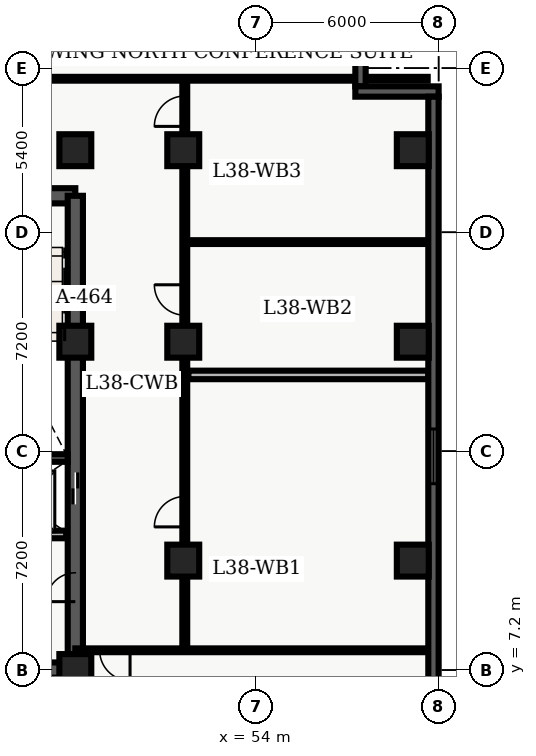
"""IFC4 building model, lengths in metres.
Left out: names, types, materials, properties, quantities, classifications, styles, units other than length and angle.
Written with IfcOpenShell. Run it as: python <this file> out.ifc"""

import sys

from ifc_helpers import new_model, entity, si_unit, converted_unit, direction, frame, origin_with_axes, origin_2d_with_axis, place, context, subcontext, project, spatial, polyline, rectangle, outline, extrude, element, fill, save


model = new_model("IFC4")
c1 = context("Model", 3, precision=1e-05, world=origin_with_axes(), true_north=direction((0.0, 1.0)))
c2 = subcontext(c1, "Body", "Model", "MODEL_VIEW")
j1 = project(units=[si_unit("LENGTHUNIT", "METRE"), converted_unit("PLANEANGLEUNIT", "DEGREE", entity("IfcPlaneAngleMeasure", 0.017), si_unit("PLANEANGLEUNIT", "RADIAN"), dimensions=[0, 0, 0, 0, 0, 0, 0])], contexts=[c1])
p1 = place(None, origin_with_axes())
s1 = spatial("IfcSite", under=j1, at=p1, CompositionType="ELEMENT")
p2 = place(p1, origin_with_axes())
s2 = spatial("IfcBuilding", under=s1, at=p2, CompositionType="ELEMENT")
p3 = place(p2, frame((0.0, 0.0, 156.3), z_axis=(0.0, 0.0, 1.0), x_axis=(1.0, 0.0, 0.0)))
s3 = spatial("IfcBuildingStorey", under=s2, at=p3, CompositionType="ELEMENT", Elevation=156.3)
p4 = place(p3, frame((40.2, 7.2, 0.0), z_axis=(0.0, 0.0, 1.0), x_axis=(1.0, 0.0, 0.0)))
e1 = element("IfcWall", 1, at=p4, inside=s3, PredefinedType="SHEAR", context=c2, shape_type="SweptSolid", body=[
    extrude(outline(polyline([(0.0, -0.25), (7.85, -0.25), (7.85, 0.25), (0.0, 0.25), (0.0, -0.25)])), origin_with_axes(), (0.0, 0.0, 1.0), 3.66),
])
p5 = place(p4, frame((2.175, 0.0, 0.0), z_axis=(0.0, 0.0, 1.0), x_axis=(1.0, 0.0, 0.0)))
e2 = element("IfcOpeningElement", 2, at=p5, cuts=e1, PredefinedType="OPENING", context=c2, shape_type="SweptSolid", body=[
    extrude(rectangle(XDim=1.05, YDim=0.52, at=origin_2d_with_axis()), origin_with_axes(), (0.0, 0.0, 1.0), 2.15),
])
p6 = place(p3, frame((40.2, 22.8, 0.0), z_axis=(0.0, 0.0, 1.0), x_axis=(1.0, 0.0, 0.0)))
e3 = element("IfcWall", 3, at=p6, inside=s3, PredefinedType="SHEAR", context=c2, shape_type="SweptSolid", body=[
    extrude(outline(polyline([(0.0, -0.25), (7.85, -0.25), (7.85, 0.25), (0.0, 0.25), (0.0, -0.25)])), origin_with_axes(), (0.0, 0.0, 1.0), 3.66),
])
p7 = place(p6, frame((5.775, 0.0, 0.0), z_axis=(0.0, 0.0, 1.0), x_axis=(1.0, 0.0, 0.0)))
e4 = element("IfcOpeningElement", 4, at=p7, cuts=e3, PredefinedType="OPENING", context=c2, shape_type="SweptSolid", body=[
    extrude(rectangle(XDim=1.05, YDim=0.52, at=origin_2d_with_axis()), origin_with_axes(), (0.0, 0.0, 1.0), 2.15),
])
p8 = place(p3, frame((48.05, 7.2, 0.0), z_axis=(0.0, 0.0, 1.0), x_axis=(0.0, 1.0, 0.0)))
e5 = element("IfcWall", 5, at=p8, inside=s3, PredefinedType="SHEAR", context=c2, shape_type="SweptSolid", body=[
    extrude(outline(polyline([(0.0, -0.25), (15.6, -0.25), (15.6, 0.25), (0.0, 0.25), (0.0, -0.25)])), origin_with_axes(), (0.0, 0.0, 1.0), 3.66),
])
p9 = place(p8, frame((5.975, 0.0, 0.0), z_axis=(0.0, 0.0, 1.0), x_axis=(1.0, 0.0, 0.0)))
e6 = element("IfcOpeningElement", 6, at=p9, cuts=e5, PredefinedType="OPENING", context=c2, shape_type="SweptSolid", body=[
    extrude(rectangle(XDim=1.05, YDim=0.52, at=origin_2d_with_axis()), origin_with_axes(), (0.0, 0.0, 1.0), 2.15),
])
p10 = place(p8, frame((2.725, 0.0, 0.0), z_axis=(0.0, 0.0, 1.0), x_axis=(1.0, 0.0, 0.0)))
e7 = element("IfcOpeningElement", 7, at=p10, cuts=e5, PredefinedType="OPENING", context=c2, shape_type="SweptSolid", body=[
    extrude(rectangle(XDim=0.95, YDim=0.52, at=origin_2d_with_axis()), origin_with_axes(), (0.0, 0.0, 1.0), 2.15),
])
p11 = place(p3, frame((44.25, 14.175, 0.0), z_axis=(0.0, 0.0, 1.0), x_axis=(1.0, 0.0, 0.0)))
e8 = element("IfcWall", 8, at=p11, inside=s3, PredefinedType="SHEAR", context=c2, shape_type="SweptSolid", body=[
    extrude(outline(polyline([(0.0, -0.125), (3.55, -0.125), (3.55, 0.125), (0.0, 0.125), (0.0, -0.125)])), origin_with_axes(), (0.0, 0.0, 1.0), 3.66),
])
for number, where, z_axis, x_axis in (
    (9, (48.05, 7.2, 0.0), (0.0, 0.0, 1.0), (1.0, 0.0, 0.0)),
    (10, (48.05, 18.0, 0.0), (0.0, 0.0, 1.0), (1.0, 0.0, 0.0)),
    (11, (48.05, 24.3, 0.0), (0.0, 0.0, 1.0), (1.0, 0.0, 0.0)),
    (12, (51.6, 10.8, 0.0), (0.0, 0.0, 1.0), (1.0, 0.0, 0.0)),
    (13, (51.6, 18.0, 0.0), (0.0, 0.0, 1.0), (1.0, 0.0, 0.0)),
    (14, (51.6, 24.3, 0.0), (0.0, 0.0, 1.0), (1.0, 0.0, 0.0)),
    (15, (59.15, 10.8, 0.0), (0.0, 0.0, 1.0), (1.0, 0.0, 0.0)),
    (16, (59.15, 18.0, 0.0), (0.0, 0.0, 1.0), (1.0, 0.0, 0.0)),
    (17, (59.15, 24.3, 0.0), (0.0, 0.0, 1.0), (1.0, 0.0, 0.0)),
):
    element("IfcColumn", number, at=place(p3, frame(where, z_axis=z_axis, x_axis=x_axis)), inside=s3, PredefinedType="COLUMN", context=c2, shape_type="SweptSolid", body=[
        extrude(rectangle(XDim=1.05, YDim=1.05, at=origin_2d_with_axis()), origin_with_axes(), (0.0, 0.0, 1.0), 3.9),
    ])
p12 = place(p3, frame((44.25, 11.66, 0.0), z_axis=(0.0, 0.0, 1.0), x_axis=(1.0, 0.0, 0.0)))
e18 = element("IfcWall", 18, at=p12, inside=s3, PredefinedType="SOLIDWALL", context=c2, shape_type="SweptSolid", body=[
    extrude(outline(polyline([(0.0, -0.125), (3.5, -0.125), (3.5, 0.125), (0.0, 0.125), (0.0, -0.125)])), origin_with_axes(), (0.0, 0.0, 1.0), 2.7),
])
p13 = place(p3, frame((51.65, 7.85, 0.0), z_axis=(0.0, 0.0, 1.0), x_axis=(0.0, 1.0, 0.0)))
e19 = element("IfcWall", 19, at=p13, inside=s3, PredefinedType="PARTITIONING", context=c2, shape_type="SweptSolid", body=[
    extrude(outline(polyline([(0.0, -0.08), (18.8, -0.08), (18.8, 0.08), (0.0, 0.08), (0.0, -0.08)])), origin_with_axes(), (0.0, 0.0, 1.0), 2.7),
])
p14 = place(p13, frame((4.559, 0.0, 0.0), z_axis=(0.0, 0.0, 1.0), x_axis=(1.0, 0.0, 0.0)))
e20 = element("IfcOpeningElement", 20, at=p14, cuts=e19, PredefinedType="OPENING", context=c2, shape_type="SweptSolid", body=[
    extrude(rectangle(XDim=1.0, YDim=0.18, at=origin_2d_with_axis()), origin_with_axes(), (0.0, 0.0, 1.0), 2.15),
])
p15 = place(p13, frame((11.523, 0.0, 0.0), z_axis=(0.0, 0.0, 1.0), x_axis=(1.0, 0.0, 0.0)))
e21 = element("IfcOpeningElement", 21, at=p15, cuts=e19, PredefinedType="OPENING", context=c2, shape_type="SweptSolid", body=[
    extrude(rectangle(XDim=1.0, YDim=0.18, at=origin_2d_with_axis()), origin_with_axes(), (0.0, 0.0, 1.0), 2.15),
])
p16 = place(p13, frame((17.733, 0.0, 0.0), z_axis=(0.0, 0.0, 1.0), x_axis=(1.0, 0.0, 0.0)))
e22 = element("IfcOpeningElement", 22, at=p16, cuts=e19, PredefinedType="OPENING", context=c2, shape_type="SweptSolid", body=[
    extrude(rectangle(XDim=1.0, YDim=0.18, at=origin_2d_with_axis()), origin_with_axes(), (0.0, 0.0, 1.0), 2.15),
])
p17 = place(p3, frame((59.665, 7.85, 0.0), z_axis=(0.0, 0.0, 1.0), x_axis=(-1.0, 0.0, 0.0)))
e23 = element("IfcWall", 23, at=p17, inside=s3, PredefinedType="PARTITIONING", context=c2, shape_type="SweptSolid", body=[
    extrude(outline(polyline([(0.0, -0.062), (11.615, -0.062), (11.615, 0.062), (0.0, 0.062), (0.0, -0.062)])), origin_with_axes(), (0.0, 0.0, 1.0), 2.7),
])
p18 = place(p17, frame((10.315, 0.0, 0.0), z_axis=(0.0, 0.0, 1.0), x_axis=(1.0, 0.0, 0.0)))
e24 = element("IfcOpeningElement", 24, at=p18, cuts=e23, PredefinedType="OPENING", context=c2, shape_type="SweptSolid", body=[
    extrude(rectangle(XDim=1.0, YDim=0.145, at=origin_2d_with_axis()), origin_with_axes(), (0.0, 0.0, 1.0), 2.15),
])
p19 = place(p3, frame((38.735, 26.65, 0.0), z_axis=(0.0, 0.0, 1.0), x_axis=(1.0, 0.0, 0.0)))
e25 = element("IfcWall", 25, at=p19, inside=s3, PredefinedType="PARTITIONING", context=c2, shape_type="SweptSolid", body=[
    extrude(outline(polyline([(0.0, -0.062), (20.905, -0.062), (20.905, 0.062), (0.0, 0.062), (0.0, -0.062)])), origin_with_axes(), (0.0, 0.0, 1.0), 2.7),
])
p20 = place(p19, frame((4.265, 0.0, 0.0), z_axis=(0.0, 0.0, 1.0), x_axis=(1.0, 0.0, 0.0)))
e26 = element("IfcOpeningElement", 26, at=p20, cuts=e25, PredefinedType="OPENING", context=c2, shape_type="SweptSolid", body=[
    extrude(rectangle(XDim=1.0, YDim=0.145, at=origin_2d_with_axis()), origin_with_axes(), (0.0, 0.0, 1.0), 2.15),
])
p21 = place(p3, frame((51.77, 16.908, 0.0), z_axis=(0.0, 0.0, 1.0), x_axis=(1.0, 0.0, 0.0)))
e27 = element("IfcWall", 27, at=p21, inside=s3, PredefinedType="PARTITIONING", context=c2, shape_type="SweptSolid", body=[
    extrude(outline(polyline([(0.0, -0.14), (7.895, -0.14), (7.895, 0.14), (0.0, 0.14), (0.0, -0.14)])), origin_with_axes(), (0.0, 0.0, 1.0), 2.7),
])
p22 = place(p3, frame((51.77, 21.277, 0.0), z_axis=(0.0, 0.0, 1.0), x_axis=(1.0, 0.0, 0.0)))
e28 = element("IfcWall", 28, at=p22, inside=s3, PredefinedType="PARTITIONING", context=c2, shape_type="SweptSolid", body=[
    extrude(outline(polyline([(0.0, -0.062), (7.895, -0.062), (7.895, 0.062), (0.0, 0.062), (0.0, -0.062)])), origin_with_axes(), (0.0, 0.0, 1.0), 2.7),
])
p23 = place(p3, frame((57.43, 28.46, 0.0), z_axis=(0.0, 0.0, 1.0), x_axis=(0.0, -1.0, 0.0)))
e29 = element("IfcWall", 29, at=p23, inside=s3, PredefinedType="SOLIDWALL", context=c2, shape_type="SweptSolid", body=[
    extrude(outline(polyline([(0.0, -0.17), (2.06, -0.17), (2.06, 0.17), (0.0, 0.17), (0.0, -0.17)])), origin_with_axes(), (0.0, 0.0, 1.0), 3.66),
])
p24 = place(p3, frame((57.26, 26.23, 0.0), z_axis=(0.0, 0.0, 1.0), x_axis=(1.0, 0.0, 0.0)))
e30 = element("IfcWall", 30, at=p24, inside=s3, PredefinedType="SOLIDWALL", context=c2, shape_type="SweptSolid", body=[
    extrude(outline(polyline([(0.0, -0.17), (2.74, -0.17), (2.74, 0.17), (0.0, 0.17), (0.0, -0.17)])), origin_with_axes(), (0.0, 0.0, 1.0), 3.66),
])
p25 = place(p3, frame((59.83, 26.06, 0.0), z_axis=(0.0, 0.0, 1.0), x_axis=(0.0, -1.0, 0.0)))
e31 = element("IfcWall", 31, at=p25, inside=s3, PredefinedType="SOLIDWALL", context=c2, shape_type="SweptSolid", body=[
    extrude(outline(polyline([(0.0, -0.17), (23.66, -0.17), (23.66, 0.17), (0.0, 0.17), (0.0, -0.17)])), origin_with_axes(), (0.0, 0.0, 1.0), 3.66),
])
p26 = place(p25, frame((11.83, 0.0, 0.45), z_axis=(0.0, 0.0, 1.0), x_axis=(1.0, 0.0, 0.0)))
e32 = element("IfcOpeningElement", 32, at=p26, cuts=e31, PredefinedType="OPENING", context=c2, shape_type="SweptSolid", body=[
    extrude(rectangle(XDim=1.8, YDim=0.36, at=origin_2d_with_axis()), origin_with_axes(), (0.0, 0.0, 1.0), 2.1),
])
p27 = place(p25, frame((20.364, 0.0, 0.45), z_axis=(0.0, 0.0, 1.0), x_axis=(1.0, 0.0, 0.0)))
e33 = element("IfcOpeningElement", 33, at=p27, cuts=e31, PredefinedType="OPENING", context=c2, shape_type="SweptSolid", body=[
    extrude(rectangle(XDim=1.8, YDim=0.36, at=origin_2d_with_axis()), origin_with_axes(), (0.0, 0.0, 1.0), 2.1),
])
p28 = place(p8, frame((5.975, 0.0, 0.0), z_axis=(0.0, 0.0, 1.0), x_axis=(1.0, 0.0, 0.0)))
e34 = element("IfcDoor", 34, at=p28, inside=s3, OperationType="SLIDING_TO_LEFT", PredefinedType="DOOR", context=c2, shape_type="SweptSolid", body=[
    extrude(rectangle(XDim=1.05, YDim=0.09, at=origin_2d_with_axis()), origin_with_axes(), (0.0, 0.0, 1.0), 2.15),
])
fill(e6, e34)
p29 = place(p8, frame((2.725, 0.0, 0.0), z_axis=(0.0, 0.0, 1.0), x_axis=(1.0, 0.0, 0.0)))
e35 = element("IfcDoor", 35, at=p29, inside=s3, OperationType="SINGLE_SWING_LEFT", PredefinedType="DOOR", context=c2, shape_type="SweptSolid", body=[
    extrude(rectangle(XDim=0.95, YDim=0.09, at=origin_2d_with_axis()), origin_with_axes(), (0.0, 0.0, 1.0), 2.15),
])
fill(e7, e35)
p30 = place(p17, frame((10.315, 0.0, 0.0), z_axis=(0.0, 0.0, 1.0), x_axis=(1.0, 0.0, 0.0)))
e36 = element("IfcDoor", 36, at=p30, inside=s3, OperationType="SINGLE_SWING_LEFT", PredefinedType="DOOR", context=c2, shape_type="SweptSolid", body=[
    extrude(rectangle(XDim=1.0, YDim=0.075, at=origin_2d_with_axis()), origin_with_axes(), (0.0, 0.0, 1.0), 2.15),
])
fill(e24, e36)
p31 = place(p13, frame((4.559, 0.0, 0.0), z_axis=(0.0, 0.0, 1.0), x_axis=(1.0, 0.0, 0.0)))
e37 = element("IfcDoor", 37, at=p31, inside=s3, OperationType="SINGLE_SWING_LEFT", PredefinedType="DOOR", context=c2, shape_type="SweptSolid", body=[
    extrude(rectangle(XDim=1.0, YDim=0.09, at=origin_2d_with_axis()), origin_with_axes(), (0.0, 0.0, 1.0), 2.15),
])
fill(e20, e37)
p32 = place(p13, frame((11.523, 0.0, 0.0), z_axis=(0.0, 0.0, 1.0), x_axis=(1.0, 0.0, 0.0)))
e38 = element("IfcDoor", 38, at=p32, inside=s3, OperationType="SINGLE_SWING_RIGHT", PredefinedType="DOOR", context=c2, shape_type="SweptSolid", body=[
    extrude(rectangle(XDim=1.0, YDim=0.09, at=origin_2d_with_axis()), origin_with_axes(), (0.0, 0.0, 1.0), 2.15),
])
fill(e21, e38)
p33 = place(p13, frame((17.733, 0.0, 0.0), z_axis=(0.0, 0.0, 1.0), x_axis=(1.0, 0.0, 0.0)))
e39 = element("IfcDoor", 39, at=p33, inside=s3, OperationType="SINGLE_SWING_LEFT", PredefinedType="DOOR", context=c2, shape_type="SweptSolid", body=[
    extrude(rectangle(XDim=1.0, YDim=0.09, at=origin_2d_with_axis()), origin_with_axes(), (0.0, 0.0, 1.0), 2.15),
])
fill(e22, e39)
p34 = place(p25, frame((11.83, 0.0, 0.45), z_axis=(0.0, 0.0, 1.0), x_axis=(1.0, 0.0, 0.0)))
e40 = element("IfcWindow", 40, at=p34, inside=s3, PredefinedType="WINDOW", context=c2, shape_type="SweptSolid", body=[
    extrude(rectangle(XDim=1.8, YDim=0.09, at=origin_2d_with_axis()), origin_with_axes(), (0.0, 0.0, 1.0), 2.1),
])
fill(e32, e40)
save(model, sys.argv[1])
